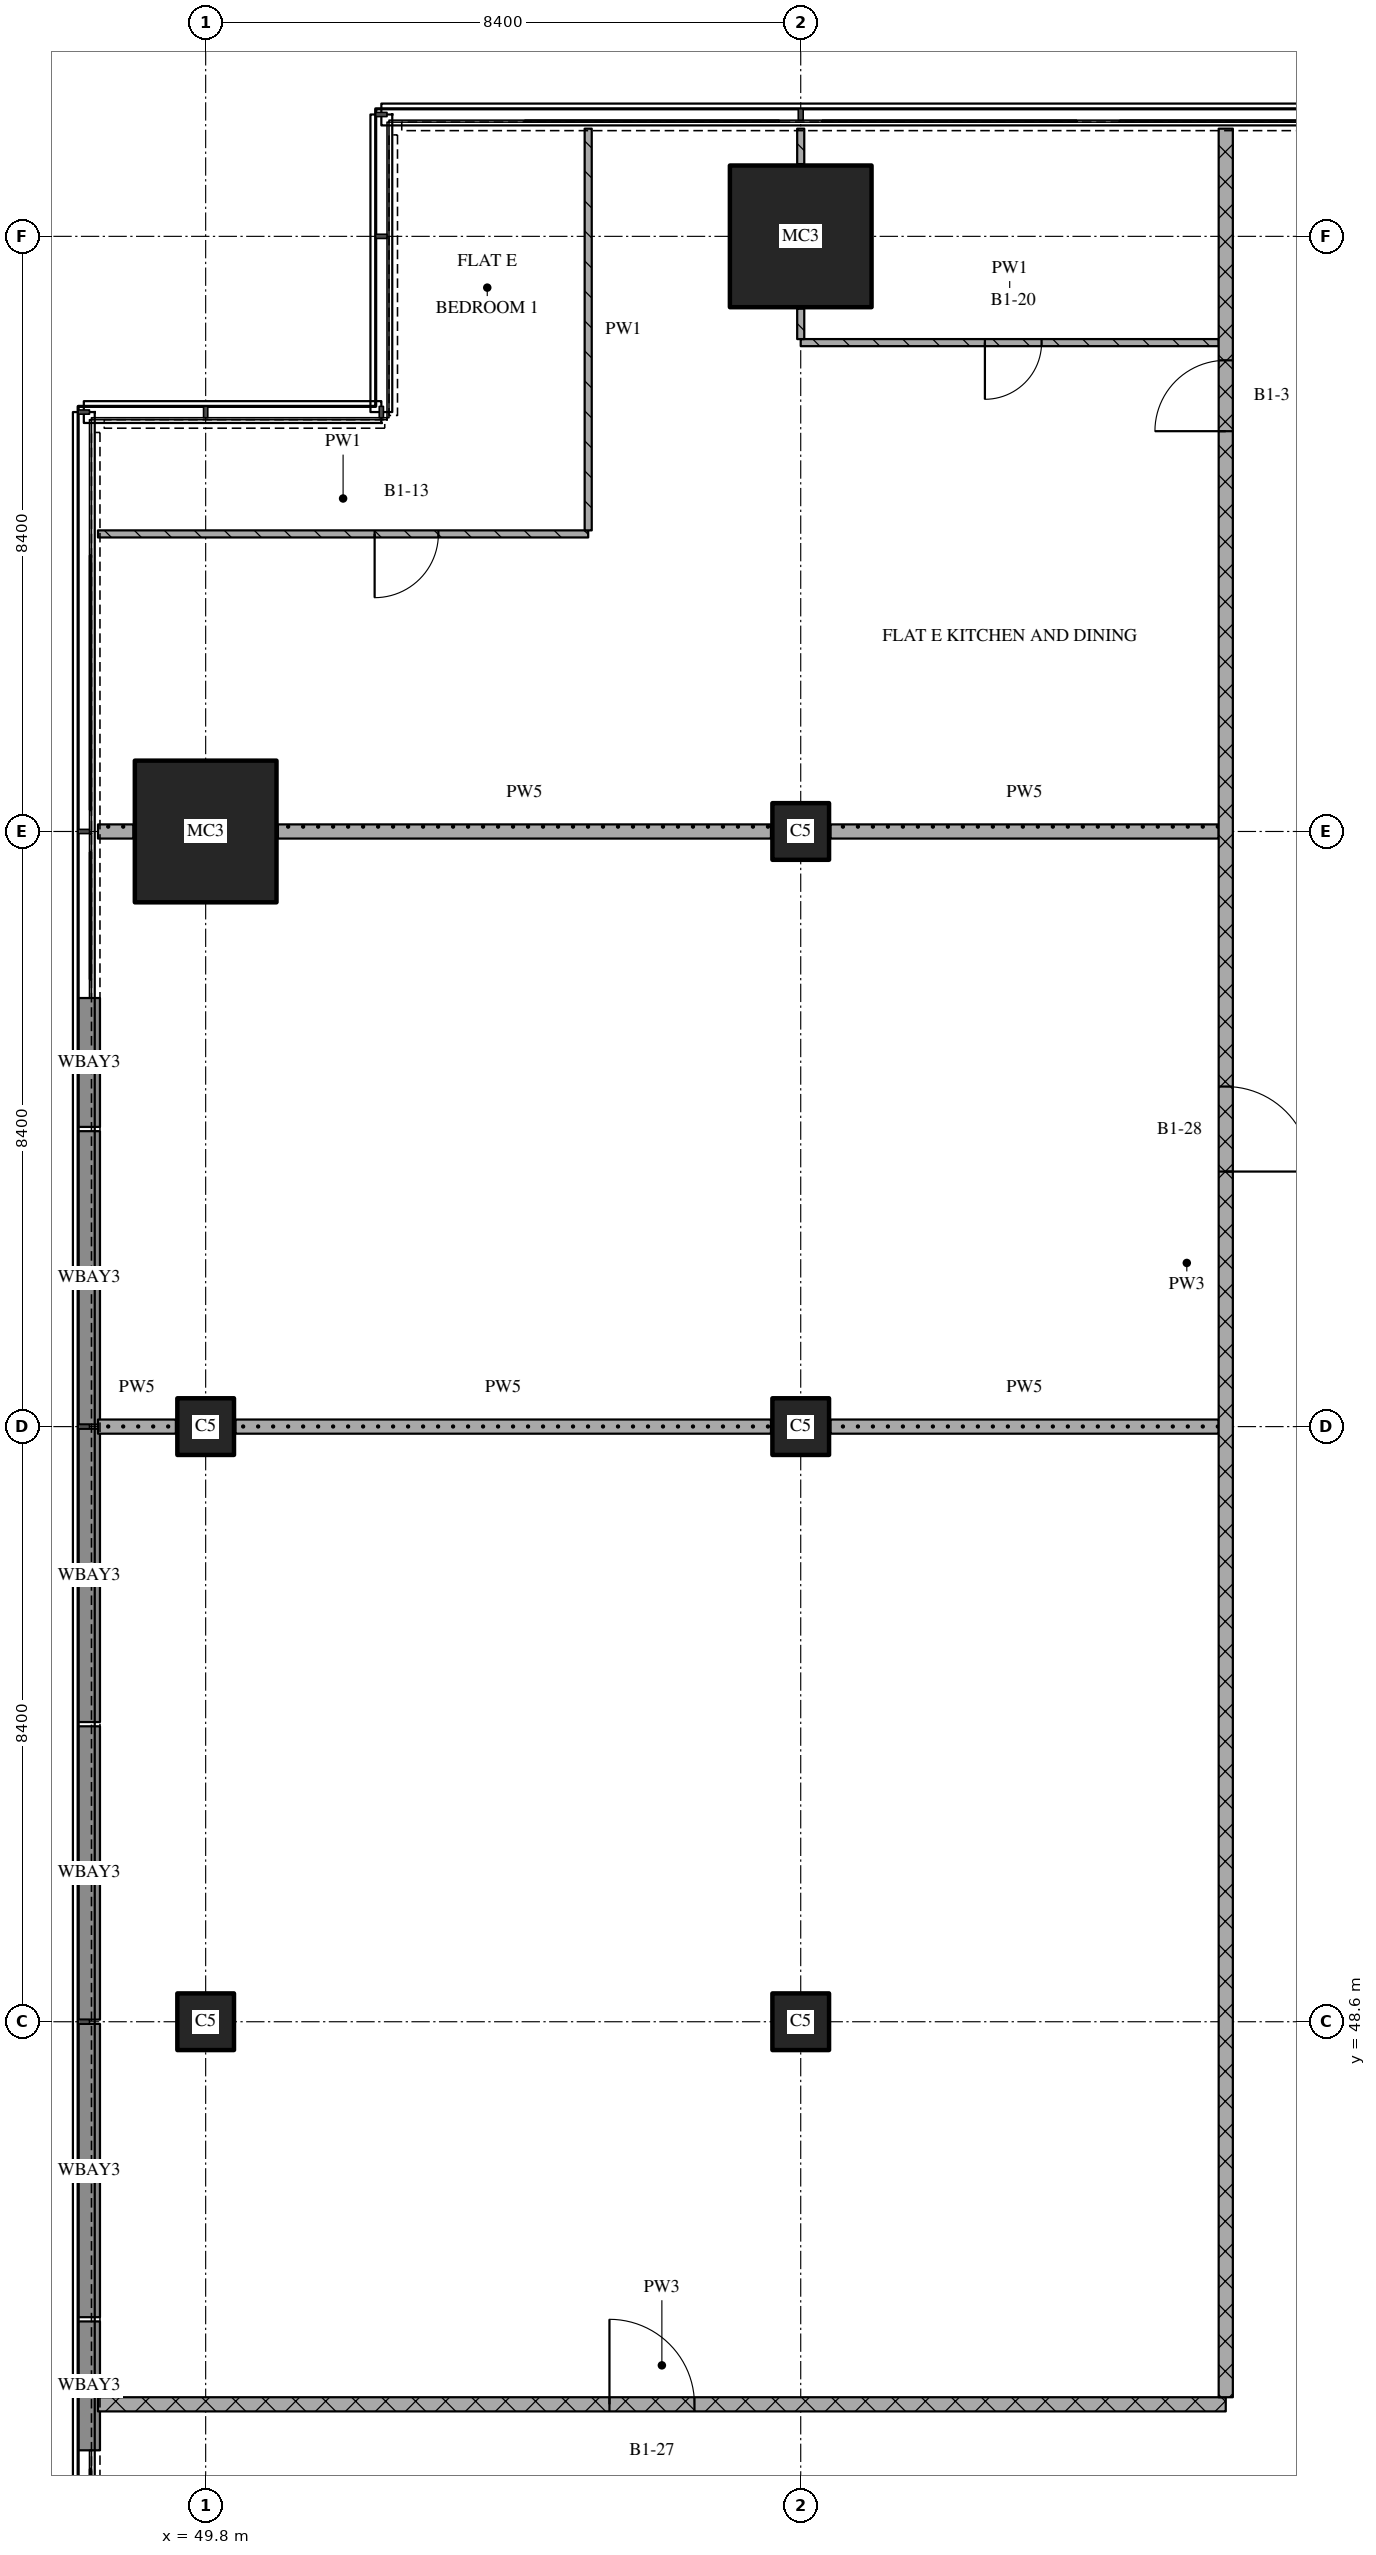
"""IFC4 building model, lengths in metres.
Left out: names, types, materials, properties, quantities, classifications, styles, units other than length and angle.
Written with IfcOpenShell. Run it as: python <this file> out.ifc"""

import sys

from ifc_helpers import new_model, si_unit, direction, frame, frame_2d, origin, origin_2d, place, context, subcontext, project, spatial, rectangle, extrude, element, fill, save


model = new_model("IFC4")
c1 = context("Model", 3, precision=1e-05, world=origin(), true_north=direction((0.0, 1.0)))
c2 = subcontext(c1, "Body", "Model", "MODEL_VIEW")
j1 = project(units=[si_unit("LENGTHUNIT", "METRE"), si_unit("PLANEANGLEUNIT", "RADIAN")], contexts=[c1])
p1 = place(None, origin())
s1 = spatial("IfcSite", under=j1, at=p1, CompositionType="ELEMENT")
p2 = place(p1, origin())
s2 = spatial("IfcBuilding", under=s1, at=p2, CompositionType="ELEMENT")
p3 = place(p2, frame((0.0, 0.0, 95.25)))
s3 = spatial("IfcBuildingStorey", under=s2, at=p3, CompositionType="ELEMENT", Elevation=95.25)
for number, where, z_axis, x_axis in (
    (1, (49.8, 48.6, 0.0), (0.0, 0.0, 1.0), (1.0, 0.0, 0.0)),
    (2, (49.8, 57.0, 0.0), (0.0, 0.0, 1.0), (1.0, 0.0, 0.0)),
):
    element("IfcColumn", number, at=place(p3, frame(where, z_axis=z_axis, x_axis=x_axis)), inside=s3, PredefinedType="COLUMN", context=c2, shape_type="SweptSolid", body=[
        extrude(rectangle(XDim=0.8, YDim=0.8, at=origin_2d()), origin(), (0.0, 0.0, 1.0), 3.6),
    ])
p4 = place(p3, frame((49.8, 65.4, 0.0), z_axis=(0.0, 0.0, 1.0), x_axis=(1.0, 0.0, 0.0)))
e3 = element("IfcColumn", 3, at=p4, inside=s3, PredefinedType="COLUMN", context=c2, shape_type="SweptSolid", body=[
    extrude(rectangle(XDim=2.0, YDim=2.0, at=origin_2d()), origin(), (0.0, 0.0, 1.0), 3.6),
])
for number, where, z_axis, x_axis in (
    (4, (58.2, 48.6, 0.0), (0.0, 0.0, 1.0), (1.0, 0.0, 0.0)),
    (5, (58.2, 57.0, 0.0), (0.0, 0.0, 1.0), (1.0, 0.0, 0.0)),
    (6, (58.2, 65.4, 0.0), (0.0, 0.0, 1.0), (1.0, 0.0, 0.0)),
):
    element("IfcColumn", number, at=place(p3, frame(where, z_axis=z_axis, x_axis=x_axis)), inside=s3, PredefinedType="COLUMN", context=c2, shape_type="SweptSolid", body=[
        extrude(rectangle(XDim=0.8, YDim=0.8, at=origin_2d()), origin(), (0.0, 0.0, 1.0), 3.6),
    ])
p5 = place(p3, frame((58.2, 73.8, 0.0), z_axis=(0.0, 0.0, 1.0), x_axis=(1.0, 0.0, 0.0)))
e7 = element("IfcColumn", 7, at=p5, inside=s3, PredefinedType="COLUMN", context=c2, shape_type="SweptSolid", body=[
    extrude(rectangle(XDim=2.0, YDim=2.0, at=origin_2d()), origin(), (0.0, 0.0, 1.0), 3.6),
])
p6 = place(p3, frame((48.154, 61.23, 0.0), z_axis=(0.0, 0.0, 1.0), x_axis=(0.0, 1.0, 0.0)))
e8 = element("IfcWall", 8, at=p6, inside=s3, PredefinedType="SOLIDWALL", context=c2, shape_type="SweptSolid", body=[
    extrude(rectangle(XDim=1.819, YDim=0.308, at=frame_2d((0.91, 0.0))), origin(), (0.0, 0.0, 1.0), 3.2),
])
for number, where, z_axis, x_axis in (
    (9, (48.154, 57.03, 0.0), (0.0, 0.0, 1.0), (0.0, 1.0, 0.0)),
    (10, (48.154, 52.83, 0.0), (0.0, 0.0, 1.0), (0.0, 1.0, 0.0)),
):
    element("IfcWall", number, at=place(p3, frame(where, z_axis=z_axis, x_axis=x_axis)), inside=s3, PredefinedType="SOLIDWALL", context=c2, shape_type="SweptSolid", body=[
        extrude(rectangle(XDim=4.14, YDim=0.308, at=frame_2d((2.07, 0.0))), origin(), (0.0, 0.0, 1.0), 3.2),
    ])
for number, where, z_axis, x_axis in (
    (11, (48.154, 48.63, 0.0), (0.0, 0.0, 1.0), (0.0, 1.0, 0.0)),
    (12, (48.154, 44.43, 0.0), (0.0, 0.0, 1.0), (0.0, 1.0, 0.0)),
):
    element("IfcWall", number, at=place(p3, frame(where, z_axis=z_axis, x_axis=x_axis)), inside=s3, PredefinedType="SOLIDWALL", context=c2, shape_type="SweptSolid", body=[
        extrude(rectangle(XDim=4.14, YDim=0.308, at=frame_2d((2.07, 0.0))), origin(), (0.0, 0.0, 1.0), 3.2),
    ])
p7 = place(p3, frame((48.154, 42.551, 0.0), z_axis=(0.0, 0.0, 1.0), x_axis=(0.0, 1.0, 0.0)))
e13 = element("IfcWall", 13, at=p7, inside=s3, PredefinedType="SOLIDWALL", context=c2, shape_type="SweptSolid", body=[
    extrude(rectangle(XDim=1.819, YDim=0.308, at=frame_2d((0.91, 0.0))), origin(), (0.0, 0.0, 1.0), 3.2),
])
p8 = place(p3, frame((48.28, 43.2, 0.0), z_axis=(0.0, 0.0, 1.0), x_axis=(1.0, 0.0, 0.0)))
e14 = element("IfcWall", 14, at=p8, inside=s3, PredefinedType="PARTITIONING", context=c2, shape_type="SweptSolid", body=[
    extrude(rectangle(XDim=15.92, YDim=0.2, at=frame_2d((7.96, 0.0))), origin(), (0.0, 0.0, 1.0), 3.32),
])
p9 = place(p8, frame((7.22, 0.0, 0.0)))
e15 = element("IfcOpeningElement", 15, at=p9, cuts=e14, PredefinedType="OPENING", context=c2, shape_type="SweptSolid", body=[
    extrude(rectangle(XDim=1.2, YDim=2.1, at=frame_2d((0.6, 1.05))), frame((0.0, 0.11, 0.0), z_axis=(0.0, -1.0, 0.0), x_axis=(1.0, 0.0, 0.0)), (0.0, 0.0, 1.0), 0.22),
])
p10 = place(p3, frame((48.28, 57.0, 0.0), z_axis=(0.0, 0.0, 1.0), x_axis=(1.0, 0.0, 0.0)))
e16 = element("IfcWall", 16, at=p10, inside=s3, PredefinedType="PARTITIONING", context=c2, shape_type="SweptSolid", body=[
    extrude(rectangle(XDim=1.1, YDim=0.2, at=frame_2d((0.55, 0.0))), origin(), (0.0, 0.0, 1.0), 3.32),
])
p11 = place(p3, frame((50.22, 57.0, 0.0), z_axis=(0.0, 0.0, 1.0), x_axis=(1.0, 0.0, 0.0)))
e17 = element("IfcWall", 17, at=p11, inside=s3, PredefinedType="PARTITIONING", context=c2, shape_type="SweptSolid", body=[
    extrude(rectangle(XDim=7.56, YDim=0.2, at=frame_2d((3.78, 0.0))), origin(), (0.0, 0.0, 1.0), 3.32),
])
p12 = place(p3, frame((58.62, 57.0, 0.0), z_axis=(0.0, 0.0, 1.0), x_axis=(1.0, 0.0, 0.0)))
e18 = element("IfcWall", 18, at=p12, inside=s3, PredefinedType="PARTITIONING", context=c2, shape_type="SweptSolid", body=[
    extrude(rectangle(XDim=5.48, YDim=0.2, at=frame_2d((2.74, 0.0))), origin(), (0.0, 0.0, 1.0), 3.32),
])
p13 = place(p3, frame((48.28, 65.4, 0.0), z_axis=(0.0, 0.0, 1.0), x_axis=(1.0, 0.0, 0.0)))
e19 = element("IfcWall", 19, at=p13, inside=s3, PredefinedType="PARTITIONING", context=c2, shape_type="SweptSolid", body=[
    extrude(rectangle(XDim=0.5, YDim=0.2, at=frame_2d((0.25, 0.0))), origin(), (0.0, 0.0, 1.0), 3.32),
])
p14 = place(p3, frame((50.82, 65.4, 0.0), z_axis=(0.0, 0.0, 1.0), x_axis=(1.0, 0.0, 0.0)))
e20 = element("IfcWall", 20, at=p14, inside=s3, PredefinedType="PARTITIONING", context=c2, shape_type="SweptSolid", body=[
    extrude(rectangle(XDim=6.96, YDim=0.2, at=frame_2d((3.48, 0.0))), origin(), (0.0, 0.0, 1.0), 3.32),
])
p15 = place(p3, frame((58.62, 65.4, 0.0), z_axis=(0.0, 0.0, 1.0), x_axis=(1.0, 0.0, 0.0)))
e21 = element("IfcWall", 21, at=p15, inside=s3, PredefinedType="PARTITIONING", context=c2, shape_type="SweptSolid", body=[
    extrude(rectangle(XDim=5.48, YDim=0.2, at=frame_2d((2.74, 0.0))), origin(), (0.0, 0.0, 1.0), 2.82),
])
p16 = place(p3, frame((48.28, 69.6, 0.0), z_axis=(0.0, 0.0, 1.0), x_axis=(1.0, 0.0, 0.0)))
e22 = element("IfcWall", 22, at=p16, inside=s3, PredefinedType="PARTITIONING", context=c2, shape_type="SweptSolid", body=[
    extrude(rectangle(XDim=6.92, YDim=0.1, at=frame_2d((3.46, 0.0))), origin(), (0.0, 0.0, 1.0), 3.32),
])
p17 = place(p16, frame((3.905, 0.0, 0.0)))
e23 = element("IfcOpeningElement", 23, at=p17, cuts=e22, PredefinedType="OPENING", context=c2, shape_type="SweptSolid", body=[
    extrude(rectangle(XDim=0.9, YDim=2.1, at=frame_2d((0.45, 1.05))), frame((0.0, 0.06, 0.0), z_axis=(0.0, -1.0, 0.0), x_axis=(1.0, 0.0, 0.0)), (0.0, 0.0, 1.0), 0.12),
])
p18 = place(p3, frame((58.2, 72.3, 0.0), z_axis=(0.0, 0.0, 1.0), x_axis=(1.0, 0.0, 0.0)))
e24 = element("IfcWall", 24, at=p18, inside=s3, PredefinedType="PARTITIONING", context=c2, shape_type="SweptSolid", body=[
    extrude(rectangle(XDim=5.9, YDim=0.1, at=frame_2d((2.95, 0.0))), origin(), (0.0, 0.0, 1.0), 3.32),
])
p19 = place(p18, frame((2.6, 0.0, 0.0)))
e25 = element("IfcOpeningElement", 25, at=p19, cuts=e24, PredefinedType="OPENING", context=c2, shape_type="SweptSolid", body=[
    extrude(rectangle(XDim=0.8, YDim=2.1, at=frame_2d((0.4, 1.05))), frame((0.0, 0.06, 0.0), z_axis=(0.0, -1.0, 0.0), x_axis=(1.0, 0.0, 0.0)), (0.0, 0.0, 1.0), 0.12),
])
p20 = place(p3, frame((55.2, 75.32, 0.0), z_axis=(0.0, 0.0, 1.0), x_axis=(0.0, -1.0, 0.0)))
e26 = element("IfcWall", 26, at=p20, inside=s3, PredefinedType="PARTITIONING", context=c2, shape_type="SweptSolid", body=[
    extrude(rectangle(XDim=5.67, YDim=0.1, at=frame_2d((2.835, 0.0))), origin(), (0.0, 0.0, 1.0), 3.32),
])
p21 = place(p3, frame((58.2, 72.78, 0.0), z_axis=(0.0, 0.0, 1.0), x_axis=(0.0, -1.0, 0.0)))
e27 = element("IfcWall", 27, at=p21, inside=s3, PredefinedType="PARTITIONING", context=c2, shape_type="SweptSolid", body=[
    extrude(rectangle(XDim=0.43, YDim=0.1, at=frame_2d((0.215, 0.0))), origin(), (0.0, 0.0, 1.0), 3.32),
])
p22 = place(p3, frame((58.2, 75.32, 0.0), z_axis=(0.0, 0.0, 1.0), x_axis=(0.0, -1.0, 0.0)))
e28 = element("IfcWall", 28, at=p22, inside=s3, PredefinedType="PARTITIONING", context=c2, shape_type="SweptSolid", body=[
    extrude(rectangle(XDim=0.5, YDim=0.1, at=frame_2d((0.25, 0.0))), origin(), (0.0, 0.0, 1.0), 3.32),
])
p23 = place(p3, frame((64.2, 43.3, 0.0), z_axis=(0.0, 0.0, 1.0), x_axis=(0.0, 1.0, 0.0)))
e29 = element("IfcWall", 29, at=p23, inside=s3, PredefinedType="PARTITIONING", context=c2, shape_type="SweptSolid", body=[
    extrude(rectangle(XDim=32.02, YDim=0.2, at=frame_2d((16.01, 0.0))), origin(), (0.0, 0.0, 1.0), 3.32),
])
p24 = place(p23, frame((17.3, 0.0, 0.0)))
e30 = element("IfcOpeningElement", 30, at=p24, cuts=e29, PredefinedType="OPENING", context=c2, shape_type="SweptSolid", body=[
    extrude(rectangle(XDim=1.2, YDim=2.1, at=frame_2d((0.6, 1.05))), frame((0.0, 0.11, 0.0), z_axis=(0.0, -1.0, 0.0), x_axis=(1.0, 0.0, 0.0)), (0.0, 0.0, 1.0), 0.22),
])
p25 = place(p23, frame((27.75, 0.0, 0.0)))
e31 = element("IfcOpeningElement", 31, at=p25, cuts=e29, PredefinedType="OPENING", context=c2, shape_type="SweptSolid", body=[
    extrude(rectangle(XDim=1.0, YDim=2.1, at=frame_2d((0.5, 1.05))), frame((0.0, 0.11, 0.0), z_axis=(0.0, -1.0, 0.0), x_axis=(1.0, 0.0, 0.0)), (0.0, 0.0, 1.0), 0.22),
])
p26 = place(p9, origin())
e32 = element("IfcDoor", 32, at=p26, inside=s3, OperationType="SINGLE_SWING_LEFT", PredefinedType="DOOR", context=c2, shape_type="SweptSolid", body=[
    extrude(rectangle(XDim=1.2, YDim=2.1, at=frame_2d((0.6, 1.05))), frame((0.0, 0.025, 0.0), z_axis=(0.0, -1.0, 0.0), x_axis=(1.0, 0.0, 0.0)), (0.0, 0.0, 1.0), 0.05),
])
fill(e15, e32)
p27 = place(p17, origin())
e33 = element("IfcDoor", 33, at=p27, inside=s3, OperationType="SINGLE_SWING_RIGHT", PredefinedType="DOOR", context=c2, shape_type="SweptSolid", body=[
    extrude(rectangle(XDim=0.9, YDim=2.1, at=frame_2d((0.45, 1.05))), frame((0.0, 0.025, 0.0), z_axis=(0.0, -1.0, 0.0), x_axis=(1.0, 0.0, 0.0)), (0.0, 0.0, 1.0), 0.05),
])
fill(e23, e33)
p28 = place(p19, origin())
e34 = element("IfcDoor", 34, at=p28, inside=s3, OperationType="SINGLE_SWING_RIGHT", PredefinedType="DOOR", context=c2, shape_type="SweptSolid", body=[
    extrude(rectangle(XDim=0.8, YDim=2.1, at=frame_2d((0.4, 1.05))), frame((0.0, 0.025, 0.0), z_axis=(0.0, -1.0, 0.0), x_axis=(1.0, 0.0, 0.0)), (0.0, 0.0, 1.0), 0.05),
])
fill(e25, e34)
p29 = place(p24, origin())
e35 = element("IfcDoor", 35, at=p29, inside=s3, OperationType="SINGLE_SWING_RIGHT", PredefinedType="DOOR", context=c2, shape_type="SweptSolid", body=[
    extrude(rectangle(XDim=1.2, YDim=2.1, at=frame_2d((0.6, 1.05))), frame((0.0, 0.025, 0.0), z_axis=(0.0, -1.0, 0.0), x_axis=(1.0, 0.0, 0.0)), (0.0, 0.0, 1.0), 0.05),
])
fill(e30, e35)
p30 = place(p25, origin())
e36 = element("IfcDoor", 36, at=p30, inside=s3, OperationType="SINGLE_SWING_LEFT", PredefinedType="DOOR", context=c2, shape_type="SweptSolid", body=[
    extrude(rectangle(XDim=1.0, YDim=2.1, at=frame_2d((0.5, 1.05))), frame((0.0, 0.025, 0.0), z_axis=(0.0, -1.0, 0.0), x_axis=(1.0, 0.0, 0.0)), (0.0, 0.0, 1.0), 0.05),
])
fill(e31, e36)
save(model, sys.argv[1])
